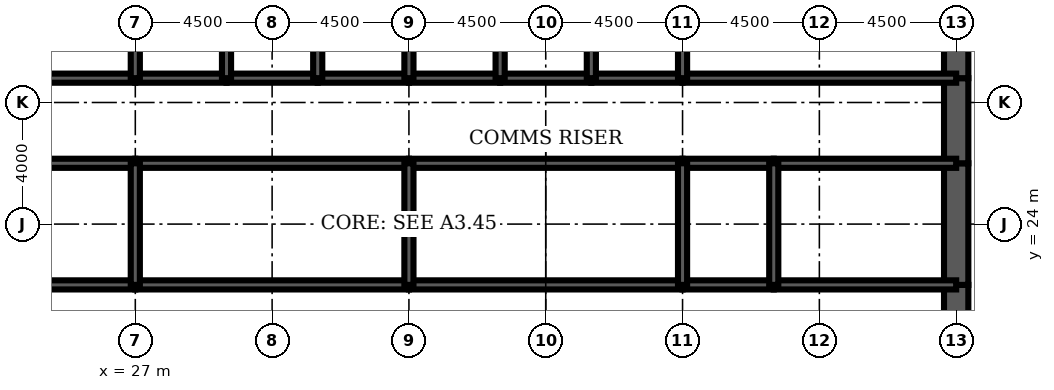
"""IFC4 building model, lengths in metres.
Left out: names, types, materials, properties, quantities, classifications, styles, units other than length and angle.
Written with IfcOpenShell. Run it as: python <this file> out.ifc"""

import sys

from ifc_helpers import new_model, si_unit, direction, frame, frame_2d, origin, place, context, subcontext, project, spatial, rectangle, extrude, element, fill, save


model = new_model("IFC4")
c1 = context("Model", 3, precision=1e-05, world=origin(), true_north=direction((0.0, 1.0)))
c2 = subcontext(c1, "Body", "Model", "MODEL_VIEW")
j1 = project(units=[si_unit("LENGTHUNIT", "METRE"), si_unit("PLANEANGLEUNIT", "RADIAN")], contexts=[c1])
p1 = place(None, origin())
s1 = spatial("IfcSite", under=j1, at=p1, CompositionType="ELEMENT")
p2 = place(p1, origin())
s2 = spatial("IfcBuilding", under=s1, at=p2, CompositionType="ELEMENT")
p3 = place(p2, frame((0.0, 0.0, 194.2)))
s3 = spatial("IfcBuildingStorey", under=s2, at=p3, CompositionType="ELEMENT", Elevation=194.2)
p4 = place(p3, frame((54.0, 19.2, 0.0), z_axis=(0.0, 0.0, 1.0), x_axis=(0.0, 1.0, 0.0)))
e1 = element("IfcWall", 1, at=p4, inside=s3, PredefinedType="SHEAR", context=c2, shape_type="SweptSolid", body=[
    extrude(rectangle(XDim=2.8, YDim=0.8, at=frame_2d((1.4, 0.0))), origin(), (0.0, 0.0, 1.0), 4.2),
])
p5 = place(p4, frame((0.4, 0.0, 0.0)))
e2 = element("IfcOpeningElement", 2, at=p5, cuts=e1, PredefinedType="OPENING", context=c2, shape_type="SweptSolid", body=[
    extrude(rectangle(XDim=1.8, YDim=2.1, at=frame_2d((0.9, 1.05))), frame((0.0, 0.41, 0.0), z_axis=(0.0, -1.0, 0.0), x_axis=(1.0, 0.0, 0.0)), (0.0, 0.0, 1.0), 0.82),
])
p6 = place(p3, frame((54.0, 22.0, 0.0), z_axis=(0.0, 0.0, 1.0), x_axis=(0.0, 1.0, 0.0)))
e3 = element("IfcWall", 3, at=p6, inside=s3, PredefinedType="SHEAR", context=c2, shape_type="SweptSolid", body=[
    extrude(rectangle(XDim=4.0, YDim=0.8, at=frame_2d((2.0, 0.0))), origin(), (0.0, 0.0, 1.0), 4.2),
])
p7 = place(p3, frame((54.0, 26.0, 0.0), z_axis=(0.0, 0.0, 1.0), x_axis=(0.0, 1.0, 0.0)))
e4 = element("IfcWall", 4, at=p7, inside=s3, PredefinedType="SHEAR", context=c2, shape_type="SweptSolid", body=[
    extrude(rectangle(XDim=2.8, YDim=0.8, at=frame_2d((1.4, 0.0))), origin(), (0.0, 0.0, 1.0), 4.2),
])
p8 = place(p7, frame((0.6, 0.0, 0.0)))
e5 = element("IfcOpeningElement", 5, at=p8, cuts=e4, PredefinedType="OPENING", context=c2, shape_type="SweptSolid", body=[
    extrude(rectangle(XDim=1.8, YDim=2.1, at=frame_2d((0.9, 1.05))), frame((0.0, 0.41, 0.0), z_axis=(0.0, -1.0, 0.0), x_axis=(1.0, 0.0, 0.0)), (0.0, 0.0, 1.0), 0.82),
])
p9 = place(p3, frame((54.0, 28.8, 0.0), z_axis=(0.0, 0.0, 1.0), x_axis=(0.0, 1.0, 0.0)))
e6 = element("IfcWall", 6, at=p9, inside=s3, PredefinedType="SHEAR", context=c2, shape_type="SweptSolid", body=[
    extrude(rectangle(XDim=3.2, YDim=0.8, at=frame_2d((1.6, 0.0))), origin(), (0.0, 0.0, 1.0), 4.2),
])
p10 = place(p3, frame((18.0, 28.8, 0.0), z_axis=(0.0, 0.0, 1.0), x_axis=(1.0, 0.0, 0.0)))
e7 = element("IfcWall", 7, at=p10, inside=s3, PredefinedType="SOLIDWALL", context=c2, shape_type="SweptSolid", body=[
    extrude(rectangle(XDim=9.0, YDim=0.3, at=frame_2d((4.5, 0.0))), origin(), (0.0, 0.0, 1.0), 4.2),
])
p11 = place(p10, frame((0.65, 0.0, 0.0)))
e8 = element("IfcOpeningElement", 8, at=p11, cuts=e7, PredefinedType="OPENING", context=c2, shape_type="SweptSolid", body=[
    extrude(rectangle(XDim=1.0, YDim=2.1, at=frame_2d((0.5, 1.05))), frame((0.0, 0.16, 0.0), z_axis=(0.0, -1.0, 0.0), x_axis=(1.0, 0.0, 0.0)), (0.0, 0.0, 1.0), 0.32),
])
p12 = place(p3, frame((27.0, 28.8, 0.0), z_axis=(0.0, 0.0, 1.0), x_axis=(1.0, 0.0, 0.0)))
e9 = element("IfcWall", 9, at=p12, inside=s3, PredefinedType="SOLIDWALL", context=c2, shape_type="SweptSolid", body=[
    extrude(rectangle(XDim=3.0, YDim=0.3, at=frame_2d((1.5, 0.0))), origin(), (0.0, 0.0, 1.0), 4.2),
])
p13 = place(p12, frame((0.95, 0.0, 0.0)))
e10 = element("IfcOpeningElement", 10, at=p13, cuts=e9, PredefinedType="OPENING", context=c2, shape_type="SweptSolid", body=[
    extrude(rectangle(XDim=1.1, YDim=2.2, at=frame_2d((0.55, 1.1))), frame((0.0, 0.16, 0.0), z_axis=(0.0, -1.0, 0.0), x_axis=(1.0, 0.0, 0.0)), (0.0, 0.0, 1.0), 0.32),
])
p14 = place(p3, frame((30.0, 28.8, 0.0), z_axis=(0.0, 0.0, 1.0), x_axis=(1.0, 0.0, 0.0)))
e11 = element("IfcWall", 11, at=p14, inside=s3, PredefinedType="SOLIDWALL", context=c2, shape_type="SweptSolid", body=[
    extrude(rectangle(XDim=3.0, YDim=0.3, at=frame_2d((1.5, 0.0))), origin(), (0.0, 0.0, 1.0), 4.2),
])
p15 = place(p14, frame((0.95, 0.0, 0.0)))
e12 = element("IfcOpeningElement", 12, at=p15, cuts=e11, PredefinedType="OPENING", context=c2, shape_type="SweptSolid", body=[
    extrude(rectangle(XDim=1.1, YDim=2.2, at=frame_2d((0.55, 1.1))), frame((0.0, 0.16, 0.0), z_axis=(0.0, -1.0, 0.0), x_axis=(1.0, 0.0, 0.0)), (0.0, 0.0, 1.0), 0.32),
])
p16 = place(p3, frame((33.0, 28.8, 0.0), z_axis=(0.0, 0.0, 1.0), x_axis=(1.0, 0.0, 0.0)))
e13 = element("IfcWall", 13, at=p16, inside=s3, PredefinedType="SOLIDWALL", context=c2, shape_type="SweptSolid", body=[
    extrude(rectangle(XDim=3.0, YDim=0.3, at=frame_2d((1.5, 0.0))), origin(), (0.0, 0.0, 1.0), 4.2),
])
p17 = place(p16, frame((0.95, 0.0, 0.0)))
e14 = element("IfcOpeningElement", 14, at=p17, cuts=e13, PredefinedType="OPENING", context=c2, shape_type="SweptSolid", body=[
    extrude(rectangle(XDim=1.1, YDim=2.2, at=frame_2d((0.55, 1.1))), frame((0.0, 0.16, 0.0), z_axis=(0.0, -1.0, 0.0), x_axis=(1.0, 0.0, 0.0)), (0.0, 0.0, 1.0), 0.32),
])
for number, where, z_axis, x_axis in (
    (15, (36.0, 28.8, 0.0), (0.0, 0.0, 1.0), (1.0, 0.0, 0.0)),
    (16, (39.0, 28.8, 0.0), (0.0, 0.0, 1.0), (1.0, 0.0, 0.0)),
):
    element("IfcWall", number, at=place(p3, frame(where, z_axis=z_axis, x_axis=x_axis)), inside=s3, PredefinedType="SOLIDWALL", context=c2, shape_type="SweptSolid", body=[
        extrude(rectangle(XDim=3.0, YDim=0.3, at=frame_2d((1.5, 0.0))), origin(), (0.0, 0.0, 1.0), 4.2),
    ])
p18 = place(p3, frame((42.0, 28.8, 0.0), z_axis=(0.0, 0.0, 1.0), x_axis=(1.0, 0.0, 0.0)))
e17 = element("IfcWall", 17, at=p18, inside=s3, PredefinedType="SOLIDWALL", context=c2, shape_type="SweptSolid", body=[
    extrude(rectangle(XDim=3.0, YDim=0.3, at=frame_2d((1.5, 0.0))), origin(), (0.0, 0.0, 1.0), 4.2),
])
p19 = place(p18, frame((0.95, 0.0, 0.0)))
e18 = element("IfcOpeningElement", 18, at=p19, cuts=e17, PredefinedType="OPENING", context=c2, shape_type="SweptSolid", body=[
    extrude(rectangle(XDim=1.1, YDim=2.2, at=frame_2d((0.55, 1.1))), frame((0.0, 0.16, 0.0), z_axis=(0.0, -1.0, 0.0), x_axis=(1.0, 0.0, 0.0)), (0.0, 0.0, 1.0), 0.32),
])
p20 = place(p3, frame((45.0, 28.8, 0.0), z_axis=(0.0, 0.0, 1.0), x_axis=(1.0, 0.0, 0.0)))
e19 = element("IfcWall", 19, at=p20, inside=s3, PredefinedType="SOLIDWALL", context=c2, shape_type="SweptSolid", body=[
    extrude(rectangle(XDim=9.0, YDim=0.3, at=frame_2d((4.5, 0.0))), origin(), (0.0, 0.0, 1.0), 4.2),
])
p21 = place(p20, frame((7.35, 0.0, 0.0)))
e20 = element("IfcOpeningElement", 20, at=p21, cuts=e19, PredefinedType="OPENING", context=c2, shape_type="SweptSolid", body=[
    extrude(rectangle(XDim=1.0, YDim=2.1, at=frame_2d((0.5, 1.05))), frame((0.0, 0.16, 0.0), z_axis=(0.0, -1.0, 0.0), x_axis=(1.0, 0.0, 0.0)), (0.0, 0.0, 1.0), 0.32),
])
p22 = place(p3, frame((24.0, 22.0, 0.0), z_axis=(0.0, 0.0, 1.0), x_axis=(1.0, 0.0, 0.0)))
e21 = element("IfcWall", 21, at=p22, inside=s3, PredefinedType="SOLIDWALL", context=c2, shape_type="SweptSolid", body=[
    extrude(rectangle(XDim=3.0, YDim=0.3, at=frame_2d((1.5, 0.0))), origin(), (0.0, 0.0, 1.0), 4.2),
])
p23 = place(p22, frame((1.0, 0.0, 0.0)))
e22 = element("IfcOpeningElement", 22, at=p23, cuts=e21, PredefinedType="OPENING", context=c2, shape_type="SweptSolid", body=[
    extrude(rectangle(XDim=1.0, YDim=2.1, at=frame_2d((0.5, 1.05))), frame((0.0, 0.16, 0.0), z_axis=(0.0, -1.0, 0.0), x_axis=(1.0, 0.0, 0.0)), (0.0, 0.0, 1.0), 0.32),
])
p24 = place(p3, frame((27.0, 22.0, 0.0), z_axis=(0.0, 0.0, 1.0), x_axis=(1.0, 0.0, 0.0)))
e23 = element("IfcWall", 23, at=p24, inside=s3, PredefinedType="SOLIDWALL", context=c2, shape_type="SweptSolid", body=[
    extrude(rectangle(XDim=9.0, YDim=0.3, at=frame_2d((4.5, 0.0))), origin(), (0.0, 0.0, 1.0), 4.2),
])
p25 = place(p24, frame((4.0, 0.0, 0.0)))
e24 = element("IfcOpeningElement", 24, at=p25, cuts=e23, PredefinedType="OPENING", context=c2, shape_type="SweptSolid", body=[
    extrude(rectangle(XDim=1.0, YDim=2.1, at=frame_2d((0.5, 1.05))), frame((0.0, 0.16, 0.0), z_axis=(0.0, -1.0, 0.0), x_axis=(1.0, 0.0, 0.0)), (0.0, 0.0, 1.0), 0.32),
])
p26 = place(p3, frame((36.0, 22.0, 0.0), z_axis=(0.0, 0.0, 1.0), x_axis=(1.0, 0.0, 0.0)))
e25 = element("IfcWall", 25, at=p26, inside=s3, PredefinedType="SOLIDWALL", context=c2, shape_type="SweptSolid", body=[
    extrude(rectangle(XDim=9.0, YDim=0.3, at=frame_2d((4.5, 0.0))), origin(), (0.0, 0.0, 1.0), 4.2),
])
p27 = place(p26, frame((4.0, 0.0, 0.0)))
e26 = element("IfcOpeningElement", 26, at=p27, cuts=e25, PredefinedType="OPENING", context=c2, shape_type="SweptSolid", body=[
    extrude(rectangle(XDim=1.0, YDim=2.1, at=frame_2d((0.5, 1.05))), frame((0.0, 0.16, 0.0), z_axis=(0.0, -1.0, 0.0), x_axis=(1.0, 0.0, 0.0)), (0.0, 0.0, 1.0), 0.32),
])
p28 = place(p3, frame((45.0, 22.0, 0.0), z_axis=(0.0, 0.0, 1.0), x_axis=(1.0, 0.0, 0.0)))
e27 = element("IfcWall", 27, at=p28, inside=s3, PredefinedType="SOLIDWALL", context=c2, shape_type="SweptSolid", body=[
    extrude(rectangle(XDim=3.0, YDim=0.3, at=frame_2d((1.5, 0.0))), origin(), (0.0, 0.0, 1.0), 4.2),
])
p29 = place(p28, frame((1.0, 0.0, 0.0)))
e28 = element("IfcOpeningElement", 28, at=p29, cuts=e27, PredefinedType="OPENING", context=c2, shape_type="SweptSolid", body=[
    extrude(rectangle(XDim=1.0, YDim=2.1, at=frame_2d((0.5, 1.05))), frame((0.0, 0.16, 0.0), z_axis=(0.0, -1.0, 0.0), x_axis=(1.0, 0.0, 0.0)), (0.0, 0.0, 1.0), 0.32),
])
p30 = place(p3, frame((48.0, 22.0, 0.0), z_axis=(0.0, 0.0, 1.0), x_axis=(1.0, 0.0, 0.0)))
e29 = element("IfcWall", 29, at=p30, inside=s3, PredefinedType="SOLIDWALL", context=c2, shape_type="SweptSolid", body=[
    extrude(rectangle(XDim=6.0, YDim=0.3, at=frame_2d((3.0, 0.0))), origin(), (0.0, 0.0, 1.0), 4.2),
])
p31 = place(p30, frame((2.0, 0.0, 0.0)))
e30 = element("IfcOpeningElement", 30, at=p31, cuts=e29, PredefinedType="OPENING", context=c2, shape_type="SweptSolid", body=[
    extrude(rectangle(XDim=1.0, YDim=2.1, at=frame_2d((0.5, 1.05))), frame((0.0, 0.16, 0.0), z_axis=(0.0, -1.0, 0.0), x_axis=(1.0, 0.0, 0.0)), (0.0, 0.0, 1.0), 0.32),
])
p32 = place(p30, frame((4.05, 0.0, 0.0)))
e31 = element("IfcOpeningElement", 31, at=p32, cuts=e29, PredefinedType="OPENING", context=c2, shape_type="SweptSolid", body=[
    extrude(rectangle(XDim=1.0, YDim=2.1, at=frame_2d((0.5, 1.05))), frame((0.0, 0.16, 0.0), z_axis=(0.0, -1.0, 0.0), x_axis=(1.0, 0.0, 0.0)), (0.0, 0.0, 1.0), 0.32),
])
p33 = place(p3, frame((24.0, 26.0, 0.0), z_axis=(0.0, 0.0, 1.0), x_axis=(1.0, 0.0, 0.0)))
e32 = element("IfcWall", 32, at=p33, inside=s3, PredefinedType="SOLIDWALL", context=c2, shape_type="SweptSolid", body=[
    extrude(rectangle(XDim=3.0, YDim=0.3, at=frame_2d((1.5, 0.0))), origin(), (0.0, 0.0, 1.0), 4.2),
])
for number, where, z_axis, x_axis in (
    (33, (27.0, 26.0, 0.0), (0.0, 0.0, 1.0), (1.0, 0.0, 0.0)),
    (34, (36.0, 26.0, 0.0), (0.0, 0.0, 1.0), (1.0, 0.0, 0.0)),
):
    element("IfcWall", number, at=place(p3, frame(where, z_axis=z_axis, x_axis=x_axis)), inside=s3, PredefinedType="SOLIDWALL", context=c2, shape_type="SweptSolid", body=[
        extrude(rectangle(XDim=9.0, YDim=0.3, at=frame_2d((4.5, 0.0))), origin(), (0.0, 0.0, 1.0), 4.2),
    ])
p34 = place(p3, frame((45.0, 26.0, 0.0), z_axis=(0.0, 0.0, 1.0), x_axis=(1.0, 0.0, 0.0)))
e35 = element("IfcWall", 35, at=p34, inside=s3, PredefinedType="SOLIDWALL", context=c2, shape_type="SweptSolid", body=[
    extrude(rectangle(XDim=3.0, YDim=0.3, at=frame_2d((1.5, 0.0))), origin(), (0.0, 0.0, 1.0), 4.2),
])
p35 = place(p3, frame((48.0, 26.0, 0.0), z_axis=(0.0, 0.0, 1.0), x_axis=(1.0, 0.0, 0.0)))
e36 = element("IfcWall", 36, at=p35, inside=s3, PredefinedType="SOLIDWALL", context=c2, shape_type="SweptSolid", body=[
    extrude(rectangle(XDim=6.0, YDim=0.3, at=frame_2d((3.0, 0.0))), origin(), (0.0, 0.0, 1.0), 4.2),
])
for number, where, z_axis, x_axis in (
    (37, (27.0, 28.8, 0.0), (0.0, 0.0, 1.0), (0.0, 1.0, 0.0)),
    (38, (30.0, 28.8, 0.0), (0.0, 0.0, 1.0), (0.0, 1.0, 0.0)),
    (39, (33.0, 28.8, 0.0), (0.0, 0.0, 1.0), (0.0, 1.0, 0.0)),
    (40, (36.0, 28.8, 0.0), (0.0, 0.0, 1.0), (0.0, 1.0, 0.0)),
    (41, (39.0, 28.8, 0.0), (0.0, 0.0, 1.0), (0.0, 1.0, 0.0)),
    (42, (42.0, 28.8, 0.0), (0.0, 0.0, 1.0), (0.0, 1.0, 0.0)),
    (43, (45.0, 28.8, 0.0), (0.0, 0.0, 1.0), (0.0, 1.0, 0.0)),
):
    element("IfcWall", number, at=place(p3, frame(where, z_axis=z_axis, x_axis=x_axis)), inside=s3, PredefinedType="SOLIDWALL", context=c2, shape_type="SweptSolid", body=[
        extrude(rectangle(XDim=3.2, YDim=0.3, at=frame_2d((1.6, 0.0))), origin(), (0.0, 0.0, 1.0), 4.2),
    ])
for number, where, z_axis, x_axis in (
    (44, (27.0, 22.0, 0.0), (0.0, 0.0, 1.0), (0.0, 1.0, 0.0)),
    (45, (36.0, 22.0, 0.0), (0.0, 0.0, 1.0), (0.0, 1.0, 0.0)),
    (46, (45.0, 22.0, 0.0), (0.0, 0.0, 1.0), (0.0, 1.0, 0.0)),
    (47, (48.0, 22.0, 0.0), (0.0, 0.0, 1.0), (0.0, 1.0, 0.0)),
):
    element("IfcWall", number, at=place(p3, frame(where, z_axis=z_axis, x_axis=x_axis)), inside=s3, PredefinedType="SOLIDWALL", context=c2, shape_type="SweptSolid", body=[
        extrude(rectangle(XDim=4.0, YDim=0.3, at=frame_2d((2.0, 0.0))), origin(), (0.0, 0.0, 1.0), 4.2),
    ])
p36 = place(p3, frame((38.5, 22.15, 0.0), z_axis=(0.0, 0.0, 1.0), x_axis=(0.0, 1.0, 0.0)))
e48 = element("IfcWall", 48, at=p36, inside=s3, PredefinedType="PARTITIONING", context=c2, shape_type="SweptSolid", body=[
    extrude(rectangle(XDim=3.7, YDim=0.15, at=frame_2d((1.85, 0.0))), origin(), (0.0, 0.0, 1.0), 3.0),
])
p37 = place(p36, frame((2.2, 0.0, 0.0)))
e49 = element("IfcOpeningElement", 49, at=p37, cuts=e48, PredefinedType="OPENING", context=c2, shape_type="SweptSolid", body=[
    extrude(rectangle(XDim=1.0, YDim=2.1, at=frame_2d((0.5, 1.05))), frame((0.0, 0.085, 0.0), z_axis=(0.0, -1.0, 0.0), x_axis=(1.0, 0.0, 0.0)), (0.0, 0.0, 1.0), 0.17),
])
p38 = place(p3, frame((51.425, 22.15, 0.0), z_axis=(0.0, 0.0, 1.0), x_axis=(0.0, 1.0, 0.0)))
e50 = element("IfcWall", 50, at=p38, inside=s3, PredefinedType="PARTITIONING", context=c2, shape_type="SweptSolid", body=[
    extrude(rectangle(XDim=3.7, YDim=0.15, at=frame_2d((1.85, 0.0))), origin(), (0.0, 0.0, 1.0), 3.0),
])
p39 = place(p3, frame((25.2, 26.15, 0.0), z_axis=(0.0, 0.0, 1.0), x_axis=(0.0, 1.0, 0.0)))
e51 = element("IfcWall", 51, at=p39, inside=s3, PredefinedType="PARTITIONING", context=c2, shape_type="SweptSolid", body=[
    extrude(rectangle(XDim=2.5, YDim=0.15, at=frame_2d((1.25, 0.0))), origin(), (0.0, 0.0, 1.0), 3.0),
])
p40 = place(p39, frame((0.35, 0.0, 0.0)))
e52 = element("IfcOpeningElement", 52, at=p40, cuts=e51, PredefinedType="OPENING", context=c2, shape_type="SweptSolid", body=[
    extrude(rectangle(XDim=1.0, YDim=2.1, at=frame_2d((0.5, 1.05))), frame((0.0, 0.085, 0.0), z_axis=(0.0, -1.0, 0.0), x_axis=(1.0, 0.0, 0.0)), (0.0, 0.0, 1.0), 0.17),
])
p41 = place(p37, origin())
e53 = element("IfcDoor", 53, at=p41, inside=s3, OperationType="SINGLE_SWING_RIGHT", PredefinedType="DOOR", context=c2, shape_type="SweptSolid", body=[
    extrude(rectangle(XDim=1.0, YDim=2.1, at=frame_2d((0.5, 1.05))), frame((0.0, 0.025, 0.0), z_axis=(0.0, -1.0, 0.0), x_axis=(1.0, 0.0, 0.0)), (0.0, 0.0, 1.0), 0.05),
])
fill(e49, e53)
p42 = place(p40, origin())
e54 = element("IfcDoor", 54, at=p42, inside=s3, OperationType="SINGLE_SWING_LEFT", PredefinedType="DOOR", context=c2, shape_type="SweptSolid", body=[
    extrude(rectangle(XDim=1.0, YDim=2.1, at=frame_2d((0.5, 1.05))), frame((0.0, 0.025, 0.0), z_axis=(0.0, -1.0, 0.0), x_axis=(1.0, 0.0, 0.0)), (0.0, 0.0, 1.0), 0.05),
])
fill(e52, e54)
p43 = place(p19, origin())
e55 = element("IfcDoor", 55, at=p43, inside=s3, OperationType="DOUBLE_DOOR_SLIDING", PredefinedType="USERDEFINED", context=c2, shape_type="SweptSolid", body=[
    extrude(rectangle(XDim=1.1, YDim=2.2, at=frame_2d((0.55, 1.1))), frame((0.0, 0.025, 0.0), z_axis=(0.0, -1.0, 0.0), x_axis=(1.0, 0.0, 0.0)), (0.0, 0.0, 1.0), 0.05),
])
fill(e18, e55)
p44 = place(p13, origin())
e56 = element("IfcDoor", 56, at=p44, inside=s3, OperationType="DOUBLE_DOOR_SLIDING", PredefinedType="USERDEFINED", context=c2, shape_type="SweptSolid", body=[
    extrude(rectangle(XDim=1.1, YDim=2.2, at=frame_2d((0.55, 1.1))), frame((0.0, 0.025, 0.0), z_axis=(0.0, -1.0, 0.0), x_axis=(1.0, 0.0, 0.0)), (0.0, 0.0, 1.0), 0.05),
])
fill(e10, e56)
p45 = place(p15, origin())
e57 = element("IfcDoor", 57, at=p45, inside=s3, OperationType="DOUBLE_DOOR_SLIDING", PredefinedType="USERDEFINED", context=c2, shape_type="SweptSolid", body=[
    extrude(rectangle(XDim=1.1, YDim=2.2, at=frame_2d((0.55, 1.1))), frame((0.0, 0.025, 0.0), z_axis=(0.0, -1.0, 0.0), x_axis=(1.0, 0.0, 0.0)), (0.0, 0.0, 1.0), 0.05),
])
fill(e12, e57)
p46 = place(p17, origin())
e58 = element("IfcDoor", 58, at=p46, inside=s3, OperationType="DOUBLE_DOOR_SLIDING", PredefinedType="USERDEFINED", context=c2, shape_type="SweptSolid", body=[
    extrude(rectangle(XDim=1.1, YDim=2.2, at=frame_2d((0.55, 1.1))), frame((0.0, 0.025, 0.0), z_axis=(0.0, -1.0, 0.0), x_axis=(1.0, 0.0, 0.0)), (0.0, 0.0, 1.0), 0.05),
])
fill(e14, e58)
p47 = place(p21, origin())
e59 = element("IfcDoor", 59, at=p47, inside=s3, OperationType="SINGLE_SWING_RIGHT", PredefinedType="DOOR", context=c2, shape_type="SweptSolid", body=[
    extrude(rectangle(XDim=1.0, YDim=2.1, at=frame_2d((0.5, 1.05))), frame((0.0, 0.025, 0.0), z_axis=(0.0, -1.0, 0.0), x_axis=(1.0, 0.0, 0.0)), (0.0, 0.0, 1.0), 0.05),
])
fill(e20, e59)
p48 = place(p5, origin())
e60 = element("IfcDoor", 60, at=p48, inside=s3, OperationType="SINGLE_SWING_LEFT", PredefinedType="DOOR", context=c2, shape_type="SweptSolid", body=[
    extrude(rectangle(XDim=1.8, YDim=2.1, at=frame_2d((0.9, 1.05))), frame((0.0, 0.4, 0.0), z_axis=(0.0, -1.0, 0.0), x_axis=(1.0, 0.0, 0.0)), (0.0, 0.0, 1.0), 0.8),
])
fill(e2, e60)
p49 = place(p8, origin())
e61 = element("IfcDoor", 61, at=p49, inside=s3, OperationType="SINGLE_SWING_LEFT", PredefinedType="DOOR", context=c2, shape_type="SweptSolid", body=[
    extrude(rectangle(XDim=1.8, YDim=2.1, at=frame_2d((0.9, 1.05))), frame((0.0, 0.4, 0.0), z_axis=(0.0, -1.0, 0.0), x_axis=(1.0, 0.0, 0.0)), (0.0, 0.0, 1.0), 0.8),
])
fill(e5, e61)
p50 = place(p23, origin())
e62 = element("IfcDoor", 62, at=p50, inside=s3, OperationType="SINGLE_SWING_LEFT", PredefinedType="DOOR", context=c2, shape_type="SweptSolid", body=[
    extrude(rectangle(XDim=1.0, YDim=2.1, at=frame_2d((0.5, 1.05))), frame((0.0, 0.025, 0.0), z_axis=(0.0, -1.0, 0.0), x_axis=(1.0, 0.0, 0.0)), (0.0, 0.0, 1.0), 0.05),
])
fill(e22, e62)
p51 = place(p25, origin())
e63 = element("IfcDoor", 63, at=p51, inside=s3, OperationType="SINGLE_SWING_LEFT", PredefinedType="DOOR", context=c2, shape_type="SweptSolid", body=[
    extrude(rectangle(XDim=1.0, YDim=2.1, at=frame_2d((0.5, 1.05))), frame((0.0, 0.025, 0.0), z_axis=(0.0, -1.0, 0.0), x_axis=(1.0, 0.0, 0.0)), (0.0, 0.0, 1.0), 0.05),
])
fill(e24, e63)
p52 = place(p27, origin())
e64 = element("IfcDoor", 64, at=p52, inside=s3, OperationType="SINGLE_SWING_LEFT", PredefinedType="DOOR", context=c2, shape_type="SweptSolid", body=[
    extrude(rectangle(XDim=1.0, YDim=2.1, at=frame_2d((0.5, 1.05))), frame((0.0, 0.025, 0.0), z_axis=(0.0, -1.0, 0.0), x_axis=(1.0, 0.0, 0.0)), (0.0, 0.0, 1.0), 0.05),
])
fill(e26, e64)
p53 = place(p29, origin())
e65 = element("IfcDoor", 65, at=p53, inside=s3, OperationType="SINGLE_SWING_LEFT", PredefinedType="DOOR", context=c2, shape_type="SweptSolid", body=[
    extrude(rectangle(XDim=1.0, YDim=2.1, at=frame_2d((0.5, 1.05))), frame((0.0, 0.025, 0.0), z_axis=(0.0, -1.0, 0.0), x_axis=(1.0, 0.0, 0.0)), (0.0, 0.0, 1.0), 0.05),
])
fill(e28, e65)
p54 = place(p31, origin())
e66 = element("IfcDoor", 66, at=p54, inside=s3, OperationType="SINGLE_SWING_LEFT", PredefinedType="DOOR", context=c2, shape_type="SweptSolid", body=[
    extrude(rectangle(XDim=1.0, YDim=2.1, at=frame_2d((0.5, 1.05))), frame((0.0, 0.025, 0.0), z_axis=(0.0, -1.0, 0.0), x_axis=(1.0, 0.0, 0.0)), (0.0, 0.0, 1.0), 0.05),
])
fill(e30, e66)
p55 = place(p32, origin())
e67 = element("IfcDoor", 67, at=p55, inside=s3, OperationType="SINGLE_SWING_RIGHT", PredefinedType="DOOR", context=c2, shape_type="SweptSolid", body=[
    extrude(rectangle(XDim=1.0, YDim=2.1, at=frame_2d((0.5, 1.05))), frame((0.0, 0.025, 0.0), z_axis=(0.0, -1.0, 0.0), x_axis=(1.0, 0.0, 0.0)), (0.0, 0.0, 1.0), 0.05),
])
fill(e31, e67)
save(model, sys.argv[1])
